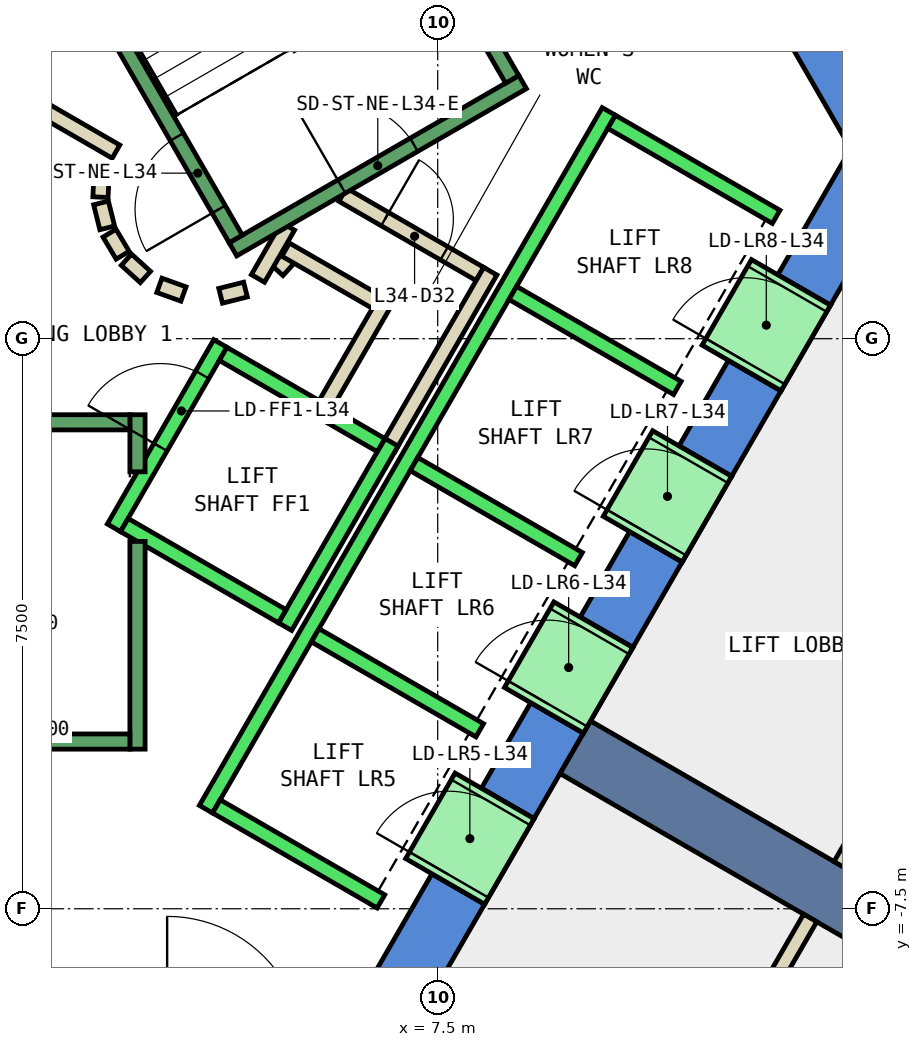
"""IFC4 building model, lengths in metres.
Left out: names, types, materials, properties, quantities, classifications, styles, units other than length and angle.
Written with IfcOpenShell. Run it as: python <this file> out.ifc"""

import sys

from ifc_helpers import new_model, si_unit, direction, frame, frame_2d, origin, place, context, subcontext, project, spatial, polyline, rectangle, outline, extrude, element, fill, save


model = new_model("IFC4")
c1 = context("Model", 3, precision=1e-05, world=origin(), true_north=direction((0.0, 1.0)))
c2 = subcontext(c1, "Body", "Model", "MODEL_VIEW")
j1 = project(units=[si_unit("LENGTHUNIT", "METRE"), si_unit("PLANEANGLEUNIT", "RADIAN")], contexts=[c1])
p1 = place(None, origin())
s1 = spatial("IfcSite", under=j1, at=p1, CompositionType="ELEMENT")
p2 = place(p1, origin())
s2 = spatial("IfcBuilding", under=s1, at=p2, CompositionType="ELEMENT")
p3 = place(p2, frame((0.0, 0.0, 155.0)))
s3 = spatial("IfcBuildingStorey", under=s2, at=p3, CompositionType="ELEMENT", Elevation=155.0)
p4 = place(p3, frame((0.0, 0.0, -0.4)))
e1 = element("IfcWall", 1, at=p4, inside=s3, PredefinedType="SHEAR", context=c2, shape_type="SweptSolid", body=[
    extrude(outline(polyline([(8.517, 11.748), (7.824, 11.348), (12.933, 2.5), (13.856, 2.5), (8.517, 11.748)])), origin(), (0.0, 0.0, 1.0), 4.2),
])
p5 = place(p3, frame((0.0, 0.0, -0.4)))
e2 = element("IfcWall", 2, at=p5, inside=s3, PredefinedType="SHEAR", context=c2, shape_type="SweptSolid", body=[
    extrude(outline(polyline([(8.117, -7.44), (7.424, -7.04), (6.466, -8.7), (6.928, -9.5), (8.117, -7.44)])), origin(), (0.0, 0.0, 1.0), 4.2),
])
p6 = place(p3, frame((0.0, 0.0, -0.4)))
e3 = element("IfcWall", 3, at=p6, inside=s3, PredefinedType="SHEAR", context=c2, shape_type="SweptSolid", body=[
    extrude(outline(polyline([(9.417, -5.189), (8.724, -4.789), (8.075, -5.914), (8.767, -6.314), (9.417, -5.189)])), origin(), (0.0, 0.0, 1.0), 4.2),
])
p7 = place(p3, frame((0.0, 0.0, -0.4)))
e4 = element("IfcWall", 4, at=p7, inside=s3, PredefinedType="SHEAR", context=c2, shape_type="SweptSolid", body=[
    extrude(outline(polyline([(10.717, -2.937), (10.025, -2.537), (9.374, -3.663), (10.067, -4.063), (10.717, -2.937)])), origin(), (0.0, 0.0, 1.0), 4.2),
])
p8 = place(p3, frame((0.0, 0.0, -0.4)))
e5 = element("IfcWall", 5, at=p8, inside=s3, PredefinedType="SHEAR", context=c2, shape_type="SweptSolid", body=[
    extrude(outline(polyline([(12.017, -0.686), (11.324, -0.286), (10.675, -1.411), (11.367, -1.811), (12.017, -0.686)])), origin(), (0.0, 0.0, 1.0), 4.2),
])
p9 = place(p3, frame((0.0, 0.0, -0.4)))
e6 = element("IfcWall", 6, at=p9, inside=s3, PredefinedType="SHEAR", context=c2, shape_type="SweptSolid", body=[
    extrude(outline(polyline([(11.974, 0.84), (12.667, 0.44), (13.856, 2.5), (12.933, 2.5), (11.974, 0.84)])), origin(), (0.0, 0.0, 1.0), 4.2),
])
p10 = place(p3, frame((0.0, 0.0, 3.6)))
e7 = element("IfcWall", 7, at=p10, inside=s3, PredefinedType="SHEAR", context=c2, shape_type="SweptSolid", body=[
    extrude(outline(polyline([(8.767, -6.314), (8.075, -5.914), (7.424, -7.04), (8.117, -7.44), (8.767, -6.314)])), origin(), (0.0, 0.0, 1.0), 0.2),
])
p11 = place(p3, frame((0.0, 0.0, 3.6)))
e8 = element("IfcWall", 8, at=p11, inside=s3, PredefinedType="SHEAR", context=c2, shape_type="SweptSolid", body=[
    extrude(outline(polyline([(10.067, -4.063), (9.374, -3.663), (8.724, -4.789), (9.417, -5.189), (10.067, -4.063)])), origin(), (0.0, 0.0, 1.0), 0.2),
])
p12 = place(p3, frame((0.0, 0.0, 3.6)))
e9 = element("IfcWall", 9, at=p12, inside=s3, PredefinedType="SHEAR", context=c2, shape_type="SweptSolid", body=[
    extrude(outline(polyline([(11.367, -1.811), (10.675, -1.411), (10.025, -2.537), (10.717, -2.937), (11.367, -1.811)])), origin(), (0.0, 0.0, 1.0), 0.2),
])
p13 = place(p3, frame((0.0, 0.0, 3.6)))
e10 = element("IfcWall", 10, at=p13, inside=s3, PredefinedType="SHEAR", context=c2, shape_type="SweptSolid", body=[
    extrude(outline(polyline([(12.667, 0.44), (11.974, 0.84), (11.324, -0.286), (12.017, -0.686), (12.667, 0.44)])), origin(), (0.0, 0.0, 1.0), 0.2),
])
p14 = place(p3, frame((9.31, -5.375, -0.4), z_axis=(0.0, 0.0, 1.0), x_axis=(0.866017533419, -0.500013631625, 0.0)))
e11 = element("IfcWall", 11, at=p14, inside=s3, PredefinedType="SHEAR", context=c2, shape_type="SweptSolid", body=[
    extrude(rectangle(XDim=9.0, YDim=0.8, at=frame_2d((4.5, 0.0))), origin(), (0.0, 0.0, 1.0), 4.2),
])
p15 = place(p3, frame((5.39, 0.898, 0.0), z_axis=(0.0, 0.0, 1.0), x_axis=(0.673828488714, 0.738887791073, 0.0)))
e12 = element("IfcWall", 12, at=p15, inside=s3, PredefinedType="PARTITIONING", context=c2, shape_type="SweptSolid", body=[
    extrude(rectangle(XDim=0.263, YDim=0.2, at=frame_2d((0.131, 0.0))), origin(), (0.0, 0.0, 1.0), 3.8),
])
p16 = place(p3, frame((5.499, 1.172, 0.0), z_axis=(0.0, 0.0, 1.0), x_axis=(0.866333505267, -0.499465972466, 0.0)))
e13 = element("IfcWall", 13, at=p16, inside=s3, PredefinedType="PARTITIONING", context=c2, shape_type="SweptSolid", body=[
    extrude(rectangle(XDim=1.374, YDim=0.2, at=frame_2d((0.687, 0.0))), origin(), (0.0, 0.0, 1.0), 3.8),
])
p17 = place(p3, frame((6.826, 0.522, 0.0), z_axis=(0.0, 0.0, 1.0), x_axis=(-0.500016722714, -0.866015748706, 0.0)))
e14 = element("IfcWall", 14, at=p17, inside=s3, PredefinedType="PARTITIONING", context=c2, shape_type="SweptSolid", body=[
    extrude(rectangle(XDim=1.7, YDim=0.2, at=frame_2d((0.85, 0.0))), origin(), (0.0, 0.0, 1.0), 3.8),
])
p18 = place(p3, frame((6.25, 1.894, 0.0), z_axis=(0.0, 0.0, 1.0), x_axis=(0.866043184279, -0.499969202016, 0.0)))
e15 = element("IfcWall", 15, at=p18, inside=s3, PredefinedType="PARTITIONING", context=c2, shape_type="SweptSolid", body=[
    extrude(rectangle(XDim=2.084, YDim=0.2, at=frame_2d((1.042, 0.0))), origin(), (0.0, 0.0, 1.0), 3.8),
])
p19 = place(p18, frame((0.642, 0.0, 0.0)))
e16 = element("IfcOpeningElement", 16, at=p19, cuts=e15, PredefinedType="OPENING", context=c2, shape_type="SweptSolid", body=[
    extrude(rectangle(XDim=0.9, YDim=2.1, at=frame_2d((0.45, 1.05))), frame((0.0, 0.11, 0.0), z_axis=(0.0, -1.0, 0.0), x_axis=(1.0, 0.0, 0.0)), (0.0, 0.0, 1.0), 0.22),
])
p20 = place(p3, frame((8.192, 0.888, 0.0), z_axis=(0.0, 0.0, 1.0), x_axis=(-0.499940625693, -0.866059680843, 0.0)))
e17 = element("IfcWall", 17, at=p20, inside=s3, PredefinedType="PARTITIONING", context=c2, shape_type="SweptSolid", body=[
    extrude(rectangle(XDim=2.68, YDim=0.2, at=frame_2d((1.34, 0.0))), origin(), (0.0, 0.0, 1.0), 3.8),
])
p21 = place(p3, frame((5.135, 0.793, 0.0), z_axis=(0.0, 0.0, 1.0), x_axis=(0.499526442893, 0.866298639529, 0.0)))
e18 = element("IfcWall", 18, at=p21, inside=s3, PredefinedType="PARTITIONING", context=c2, shape_type="SweptSolid", body=[
    extrude(rectangle(XDim=0.791, YDim=0.2, at=frame_2d((0.396, 0.0))), origin(), (0.0, 0.0, 1.0), 3.8),
])
p22 = place(p3, frame((2.012, 3.186, 0.0), z_axis=(0.0, 0.0, 1.0), x_axis=(0.865891012941, -0.500232699559, 0.0)))
e19 = element("IfcWall", 19, at=p22, inside=s3, PredefinedType="PARTITIONING", context=c2, shape_type="SweptSolid", body=[
    extrude(rectangle(XDim=1.449, YDim=0.2, at=frame_2d((0.725, 0.0))), origin(), (0.0, 0.0, 1.0), 3.8),
])
p23 = place(p3, frame((3.079, 2.199, 0.0), z_axis=(0.0, 0.0, 1.0), x_axis=(-0.047771483479, -0.998858290933, 0.0)))
e20 = element("IfcWall", 20, at=p23, inside=s3, PredefinedType="PARTITIONING", context=c2, shape_type="SweptSolid", body=[
    extrude(rectangle(XDim=0.337, YDim=0.2, at=frame_2d((0.169, 0.0))), origin(), (0.0, 0.0, 1.0), 3.8),
])
p24 = place(p3, frame((3.07, 1.786, 0.0), z_axis=(0.0, 0.0, 1.0), x_axis=(0.242705583207, -0.970099994784, 0.0)))
e21 = element("IfcWall", 21, at=p24, inside=s3, PredefinedType="PARTITIONING", context=c2, shape_type="SweptSolid", body=[
    extrude(rectangle(XDim=0.338, YDim=0.2, at=frame_2d((0.169, 0.0))), origin(), (0.0, 0.0, 1.0), 3.8),
])
for number, where, z_axis, x_axis in (
    (22, (3.182, 1.388, 0.0), (0.0, 0.0, 1.0), (0.512, -0.859, 0.0)),
    (23, (3.404, 1.039, 0.0), (0.0, 0.0, 1.0), (0.74, -0.672, 0.0)),
):
    element("IfcWall", number, at=place(p3, frame(where, z_axis=z_axis, x_axis=x_axis)), inside=s3, PredefinedType="PARTITIONING", context=c2, shape_type="SweptSolid", body=[
        extrude(rectangle(XDim=0.338, YDim=0.2, at=frame_2d((0.169, 0.0))), origin(), (0.0, 0.0, 1.0), 3.8),
    ])
p25 = place(p3, frame((3.838, 0.702, 0.0), z_axis=(0.0, 0.0, 1.0), x_axis=(0.941035081519, -0.338308993895, 0.0)))
e24 = element("IfcWall", 24, at=p25, inside=s3, PredefinedType="PARTITIONING", context=c2, shape_type="SweptSolid", body=[
    extrude(rectangle(XDim=0.337, YDim=0.2, at=frame_2d((0.168, 0.0))), origin(), (0.0, 0.0, 1.0), 3.8),
])
p26 = place(p3, frame((4.644, 0.564, 0.0), z_axis=(0.0, 0.0, 1.0), x_axis=(0.969929076366, 0.243387729394, 0.0)))
e25 = element("IfcWall", 25, at=p26, inside=s3, PredefinedType="PARTITIONING", context=c2, shape_type="SweptSolid", body=[
    extrude(rectangle(XDim=0.337, YDim=0.2, at=frame_2d((0.168, 0.0))), origin(), (0.0, 0.0, 1.0), 3.8),
])
p27 = place(p3, frame((17.621, 1.42, 0.0), z_axis=(0.0, 0.0, 1.0), x_axis=(-0.499987708133, -0.866032500381, 0.0)))
e26 = element("IfcWall", 26, at=p27, inside=s3, PredefinedType="PARTITIONING", context=c2, shape_type="SweptSolid", body=[
    extrude(rectangle(XDim=9.64, YDim=0.2, at=frame_2d((4.82, 0.0))), origin(), (0.0, 0.0, 1.0), 3.8),
])
p28 = place(p3, frame((12.401, -7.621, 0.0), z_axis=(0.0, 0.0, 1.0), x_axis=(-0.499983724212, -0.866034800411, 0.0)))
e27 = element("IfcWall", 27, at=p28, inside=s3, PredefinedType="PARTITIONING", context=c2, shape_type="SweptSolid", body=[
    extrude(rectangle(XDim=9.302, YDim=0.2, at=frame_2d((4.651, 0.0))), origin(), (0.0, 0.0, 1.0), 3.8),
])
p29 = place(p3, frame((3.24, -2.488, 0.0), z_axis=(0.0, 0.0, 1.0), x_axis=(0.49994636267, 0.866056369097, 0.0)))
e28 = element("IfcWall", 28, at=p29, inside=s3, PredefinedType="STANDARD", context=c2, shape_type="SweptSolid", body=[
    extrude(rectangle(XDim=2.8, YDim=0.2, at=frame_2d((1.4, 0.0))), origin(), (0.0, 0.0, 1.0), 3.8),
])
p30 = place(p29, frame((1.225, 0.0, 0.0)))
e29 = element("IfcOpeningElement", 29, at=p30, cuts=e28, PredefinedType="OPENING", context=c2, shape_type="SweptSolid", body=[
    extrude(rectangle(XDim=1.1, YDim=2.1, at=frame_2d((0.55, 1.05))), frame((0.0, 0.11, 0.0), z_axis=(0.0, -1.0, 0.0), x_axis=(1.0, 0.0, 0.0)), (0.0, 0.0, 1.0), 0.22),
])
p31 = place(p3, frame((5.492, -3.788, 0.0), z_axis=(0.0, 0.0, 1.0), x_axis=(0.500011755427, 0.866018616679, 0.0)))
e30 = element("IfcWall", 30, at=p31, inside=s3, PredefinedType="STANDARD", context=c2, shape_type="SweptSolid", body=[
    extrude(rectangle(XDim=2.8, YDim=0.2, at=frame_2d((1.4, 0.0))), origin(), (0.0, 0.0, 1.0), 3.8),
])
p32 = place(p3, frame((3.377, -2.452, 0.0), z_axis=(0.0, 0.0, 1.0), x_axis=(0.865955154139, -0.50012165622, 0.0)))
e31 = element("IfcWall", 31, at=p32, inside=s3, PredefinedType="STANDARD", context=c2, shape_type="SweptSolid", body=[
    extrude(rectangle(XDim=2.4, YDim=0.2, at=frame_2d((1.2, 0.0))), origin(), (0.0, 0.0, 1.0), 3.8),
])
p33 = place(p3, frame((4.677, -0.2, 0.0), z_axis=(0.0, 0.0, 1.0), x_axis=(0.865973769406, -0.500089422704, 0.0)))
e32 = element("IfcWall", 32, at=p33, inside=s3, PredefinedType="STANDARD", context=c2, shape_type="SweptSolid", body=[
    extrude(rectangle(XDim=2.399, YDim=0.2, at=frame_2d((1.2, 0.0))), origin(), (0.0, 0.0, 1.0), 3.8),
])
p34 = place(p3, frame((4.451, -6.19, 0.0), z_axis=(0.0, 0.0, 1.0), x_axis=(0.50000090737, 0.866024879913, 0.0)))
e33 = element("IfcWall", 33, at=p34, inside=s3, PredefinedType="STANDARD", context=c2, shape_type="SweptSolid", body=[
    extrude(rectangle(XDim=10.6, YDim=0.2, at=frame_2d((5.3, 0.0))), origin(), (0.0, 0.0, 1.0), 3.8),
])
for number, where, z_axis, x_axis in (
    (34, (4.588, -6.153, 0.0), (0.0, 0.0, 1.0), (0.866, -0.5, 0.0)),
    (35, (5.888, -3.902, 0.0), (0.0, 0.0, 1.0), (0.866, -0.5, 0.0)),
    (36, (7.188, -1.65, 0.0), (0.0, 0.0, 1.0), (0.866, -0.5, 0.0)),
    (37, (8.488, 0.602, 0.0), (0.0, 0.0, 1.0), (0.866, -0.5, 0.0)),
):
    element("IfcWall", number, at=place(p3, frame(where, z_axis=z_axis, x_axis=x_axis)), inside=s3, PredefinedType="STANDARD", context=c2, shape_type="SweptSolid", body=[
        extrude(rectangle(XDim=2.5, YDim=0.2, at=frame_2d((1.25, 0.0))), origin(), (0.0, 0.0, 1.0), 3.8),
    ])
p35 = place(p3, frame((9.788, 2.853, 0.0), z_axis=(0.0, 0.0, 1.0), x_axis=(0.865998541277, -0.500046524342, 0.0)))
e38 = element("IfcWall", 38, at=p35, inside=s3, PredefinedType="STANDARD", context=c2, shape_type="SweptSolid", body=[
    extrude(rectangle(XDim=2.5, YDim=0.2, at=frame_2d((1.25, 0.0))), origin(), (0.0, 0.0, 1.0), 3.8),
])
p36 = place(p3, frame((7.598, -7.14, 0.0), z_axis=(0.0, 0.0, 1.0), x_axis=(0.500362116554, 0.865816234728, 0.0)))
e39 = element("IfcWall", 39, at=p36, inside=s3, PredefinedType="STANDARD", context=c2, shape_type="SweptSolid", body=[
    extrude(rectangle(XDim=1.299, YDim=1.2, at=frame_2d((0.65, 0.0))), origin(), (0.0, 0.0, 1.0), 2.4),
])
p37 = place(p36, frame((0.1, 0.0, 0.0)))
e40 = element("IfcOpeningElement", 40, at=p37, cuts=e39, PredefinedType="OPENING", context=c2, shape_type="SweptSolid", body=[
    extrude(rectangle(XDim=1.1, YDim=2.3, at=frame_2d((0.55, 1.15))), frame((0.0, 0.61, 0.0), z_axis=(0.0, -1.0, 0.0), x_axis=(1.0, 0.0, 0.0)), (0.0, 0.0, 1.0), 1.22),
])
p38 = place(p3, frame((8.898, -4.889, 0.0), z_axis=(0.0, 0.0, 1.0), x_axis=(0.500036693733, 0.866004217611, 0.0)))
e41 = element("IfcWall", 41, at=p38, inside=s3, PredefinedType="STANDARD", context=c2, shape_type="SweptSolid", body=[
    extrude(rectangle(XDim=1.3, YDim=1.2, at=frame_2d((0.65, 0.0))), origin(), (0.0, 0.0, 1.0), 2.4),
])
p39 = place(p38, frame((0.1, 0.0, 0.0)))
e42 = element("IfcOpeningElement", 42, at=p39, cuts=e41, PredefinedType="OPENING", context=c2, shape_type="SweptSolid", body=[
    extrude(rectangle(XDim=1.1, YDim=2.3, at=frame_2d((0.55, 1.15))), frame((0.0, 0.61, 0.0), z_axis=(0.0, -1.0, 0.0), x_axis=(1.0, 0.0, 0.0)), (0.0, 0.0, 1.0), 1.22),
])
p40 = place(p3, frame((10.198, -2.637, 0.0), z_axis=(0.0, 0.0, 1.0), x_axis=(0.49989585183, 0.866085525409, 0.0)))
e43 = element("IfcWall", 43, at=p40, inside=s3, PredefinedType="STANDARD", context=c2, shape_type="SweptSolid", body=[
    extrude(rectangle(XDim=1.3, YDim=1.2, at=frame_2d((0.65, 0.0))), origin(), (0.0, 0.0, 1.0), 2.4),
])
p41 = place(p40, frame((0.1, 0.0, 0.0)))
e44 = element("IfcOpeningElement", 44, at=p41, cuts=e43, PredefinedType="OPENING", context=c2, shape_type="SweptSolid", body=[
    extrude(rectangle(XDim=1.1, YDim=2.3, at=frame_2d((0.55, 1.15))), frame((0.0, 0.61, 0.0), z_axis=(0.0, -1.0, 0.0), x_axis=(1.0, 0.0, 0.0)), (0.0, 0.0, 1.0), 1.22),
])
p42 = place(p3, frame((11.498, -0.385, 0.0), z_axis=(0.0, 0.0, 1.0), x_axis=(0.500221244143, 0.865897630733, 0.0)))
e45 = element("IfcWall", 45, at=p42, inside=s3, PredefinedType="STANDARD", context=c2, shape_type="SweptSolid", body=[
    extrude(rectangle(XDim=1.299, YDim=1.2, at=frame_2d((0.65, 0.0))), origin(), (0.0, 0.0, 1.0), 2.4),
])
p43 = place(p42, frame((0.1, 0.0, 0.0)))
e46 = element("IfcOpeningElement", 46, at=p43, cuts=e45, PredefinedType="OPENING", context=c2, shape_type="SweptSolid", body=[
    extrude(rectangle(XDim=1.1, YDim=2.3, at=frame_2d((0.55, 1.15))), frame((0.0, 0.61, 0.0), z_axis=(0.0, -1.0, 0.0), x_axis=(1.0, 0.0, 0.0)), (0.0, 0.0, 1.0), 1.22),
])
p44 = place(p3, frame((3.55, -2.667, 0.0), z_axis=(0.0, 0.0, 1.0), x_axis=(0.0, -1.0, 0.0)))
e47 = element("IfcWall", 47, at=p44, inside=s3, PredefinedType="STANDARD", context=c2, shape_type="SweptSolid", body=[
    extrude(rectangle(XDim=2.733, YDim=0.2, at=frame_2d((1.366, 0.0))), origin(), (0.0, 0.0, 1.0), 3.8),
])
p45 = place(p3, frame((3.55, -1.0, 0.0), z_axis=(0.0, 0.0, 1.0), x_axis=(0.0, -1.0, 0.0)))
e48 = element("IfcWall", 48, at=p45, inside=s3, PredefinedType="STANDARD", context=c2, shape_type="SweptSolid", body=[
    extrude(rectangle(XDim=0.751, YDim=0.2, at=frame_2d((0.375, 0.0))), origin(), (0.0, 0.0, 1.0), 3.8),
])
p46 = place(p3, frame((-3.45, -1.1, 0.0), z_axis=(0.0, 0.0, 1.0), x_axis=(1.0, 0.0, 0.0)))
e49 = element("IfcWall", 49, at=p46, inside=s3, PredefinedType="STANDARD", context=c2, shape_type="SweptSolid", body=[
    extrude(rectangle(XDim=6.9, YDim=0.2, at=frame_2d((3.45, 0.0))), origin(), (0.0, 0.0, 1.0), 3.8),
])
p47 = place(p46, frame((0.45, 0.0, 0.0)))
e50 = element("IfcOpeningElement", 50, at=p47, cuts=e49, PredefinedType="OPENING", context=c2, shape_type="SweptSolid", body=[
    extrude(rectangle(XDim=1.1, YDim=2.2, at=frame_2d((0.55, 1.1))), frame((0.0, 0.11, 0.0), z_axis=(0.0, -1.0, 0.0), x_axis=(1.0, 0.0, 0.0)), (0.0, 0.0, 1.0), 0.22),
])
p48 = place(p3, frame((-3.45, -5.3, 0.0), z_axis=(0.0, 0.0, 1.0), x_axis=(1.0, 0.0, 0.0)))
e51 = element("IfcWall", 51, at=p48, inside=s3, PredefinedType="STANDARD", context=c2, shape_type="SweptSolid", body=[
    extrude(rectangle(XDim=6.9, YDim=0.2, at=frame_2d((3.45, 0.0))), origin(), (0.0, 0.0, 1.0), 3.8),
])
p49 = place(p3, frame((4.806, 1.176, 0.0), z_axis=(0.0, 0.0, 1.0), x_axis=(0.866059941101, 0.499940174841, 0.0)))
e52 = element("IfcWall", 52, at=p49, inside=s3, PredefinedType="STANDARD", context=c2, shape_type="SweptSolid", body=[
    extrude(rectangle(XDim=4.4, YDim=0.2, at=frame_2d((2.2, 0.0))), origin(), (0.0, 0.0, 1.0), 3.8),
])
p50 = place(p49, frame((1.65, 0.0, 0.0)))
e53 = element("IfcOpeningElement", 53, at=p50, cuts=e52, PredefinedType="OPENING", context=c2, shape_type="SweptSolid", body=[
    extrude(rectangle(XDim=1.1, YDim=2.2, at=frame_2d((0.55, 1.1))), frame((0.0, 0.11, 0.0), z_axis=(0.0, -1.0, 0.0), x_axis=(1.0, 0.0, 0.0)), (0.0, 0.0, 1.0), 0.22),
])
p51 = place(p3, frame((4.843, 1.312, 0.0), z_axis=(0.0, 0.0, 1.0), x_axis=(-0.499963383562, 0.866046543262, 0.0)))
e54 = element("IfcWall", 54, at=p51, inside=s3, PredefinedType="STANDARD", context=c2, shape_type="SweptSolid", body=[
    extrude(rectangle(XDim=6.9, YDim=0.2, at=frame_2d((3.45, 0.0))), origin(), (0.0, 0.0, 1.0), 3.8),
])
p52 = place(p51, frame((0.45, 0.0, 0.0)))
e55 = element("IfcOpeningElement", 55, at=p52, cuts=e54, PredefinedType="OPENING", context=c2, shape_type="SweptSolid", body=[
    extrude(rectangle(XDim=1.1, YDim=2.2, at=frame_2d((0.55, 1.1))), frame((0.0, 0.11, 0.0), z_axis=(0.0, -1.0, 0.0), x_axis=(1.0, 0.0, 0.0)), (0.0, 0.0, 1.0), 0.22),
])
p53 = place(p3, frame((8.48, 3.412, 0.0), z_axis=(0.0, 0.0, 1.0), x_axis=(-0.499978703459, 0.866037698999, 0.0)))
e56 = element("IfcWall", 56, at=p53, inside=s3, PredefinedType="STANDARD", context=c2, shape_type="SweptSolid", body=[
    extrude(rectangle(XDim=6.9, YDim=0.2, at=frame_2d((3.45, 0.0))), origin(), (0.0, 0.0, 1.0), 3.8),
])
p54 = place(p19, origin())
e57 = element("IfcDoor", 57, at=p54, inside=s3, OperationType="SINGLE_SWING_LEFT", PredefinedType="DOOR", context=c2, shape_type="SweptSolid", body=[
    extrude(rectangle(XDim=0.9, YDim=2.1, at=frame_2d((0.45, 1.05))), frame((0.0, 0.025, 0.0), z_axis=(0.0, -1.0, 0.0), x_axis=(1.0, 0.0, 0.0)), (0.0, 0.0, 1.0), 0.05),
])
fill(e16, e57)
p55 = place(p37, origin())
e58 = element("IfcDoor", 58, at=p55, inside=s3, OperationType="SLIDING_TO_LEFT", PredefinedType="DOOR", context=c2, shape_type="SweptSolid", body=[
    extrude(rectangle(XDim=1.1, YDim=2.3, at=frame_2d((0.55, 1.15))), frame((0.0, 0.025, 0.0), z_axis=(0.0, -1.0, 0.0), x_axis=(1.0, 0.0, 0.0)), (0.0, 0.0, 1.0), 0.05),
])
fill(e40, e58)
p56 = place(p39, origin())
e59 = element("IfcDoor", 59, at=p56, inside=s3, OperationType="SLIDING_TO_LEFT", PredefinedType="DOOR", context=c2, shape_type="SweptSolid", body=[
    extrude(rectangle(XDim=1.1, YDim=2.3, at=frame_2d((0.55, 1.15))), frame((0.0, 0.025, 0.0), z_axis=(0.0, -1.0, 0.0), x_axis=(1.0, 0.0, 0.0)), (0.0, 0.0, 1.0), 0.05),
])
fill(e42, e59)
p57 = place(p41, origin())
e60 = element("IfcDoor", 60, at=p57, inside=s3, OperationType="SLIDING_TO_LEFT", PredefinedType="DOOR", context=c2, shape_type="SweptSolid", body=[
    extrude(rectangle(XDim=1.1, YDim=2.3, at=frame_2d((0.55, 1.15))), frame((0.0, 0.025, 0.0), z_axis=(0.0, -1.0, 0.0), x_axis=(1.0, 0.0, 0.0)), (0.0, 0.0, 1.0), 0.05),
])
fill(e44, e60)
p58 = place(p43, origin())
e61 = element("IfcDoor", 61, at=p58, inside=s3, OperationType="SLIDING_TO_LEFT", PredefinedType="DOOR", context=c2, shape_type="SweptSolid", body=[
    extrude(rectangle(XDim=1.1, YDim=2.3, at=frame_2d((0.55, 1.15))), frame((0.0, 0.025, 0.0), z_axis=(0.0, -1.0, 0.0), x_axis=(1.0, 0.0, 0.0)), (0.0, 0.0, 1.0), 0.05),
])
fill(e46, e61)
p59 = place(p30, origin())
e62 = element("IfcDoor", 62, at=p59, inside=s3, OperationType="SLIDING_TO_LEFT", PredefinedType="DOOR", context=c2, shape_type="SweptSolid", body=[
    extrude(rectangle(XDim=1.1, YDim=2.1, at=frame_2d((0.55, 1.05))), frame((0.0, 0.025, 0.0), z_axis=(0.0, -1.0, 0.0), x_axis=(1.0, 0.0, 0.0)), (0.0, 0.0, 1.0), 0.05),
])
fill(e29, e62)
p60 = place(p52, origin())
e63 = element("IfcDoor", 63, at=p60, inside=s3, OperationType="SINGLE_SWING_LEFT", PredefinedType="DOOR", context=c2, shape_type="SweptSolid", body=[
    extrude(rectangle(XDim=1.1, YDim=2.2, at=frame_2d((0.55, 1.1))), frame((0.0, 0.025, 0.0), z_axis=(0.0, -1.0, 0.0), x_axis=(1.0, 0.0, 0.0)), (0.0, 0.0, 1.0), 0.05),
])
fill(e55, e63)
p61 = place(p50, origin())
e64 = element("IfcDoor", 64, at=p61, inside=s3, OperationType="SINGLE_SWING_LEFT", PredefinedType="DOOR", context=c2, shape_type="SweptSolid", body=[
    extrude(rectangle(XDim=1.1, YDim=2.2, at=frame_2d((0.55, 1.1))), frame((0.0, 0.025, 0.0), z_axis=(0.0, -1.0, 0.0), x_axis=(1.0, 0.0, 0.0)), (0.0, 0.0, 1.0), 0.05),
])
fill(e53, e64)
save(model, sys.argv[1])
